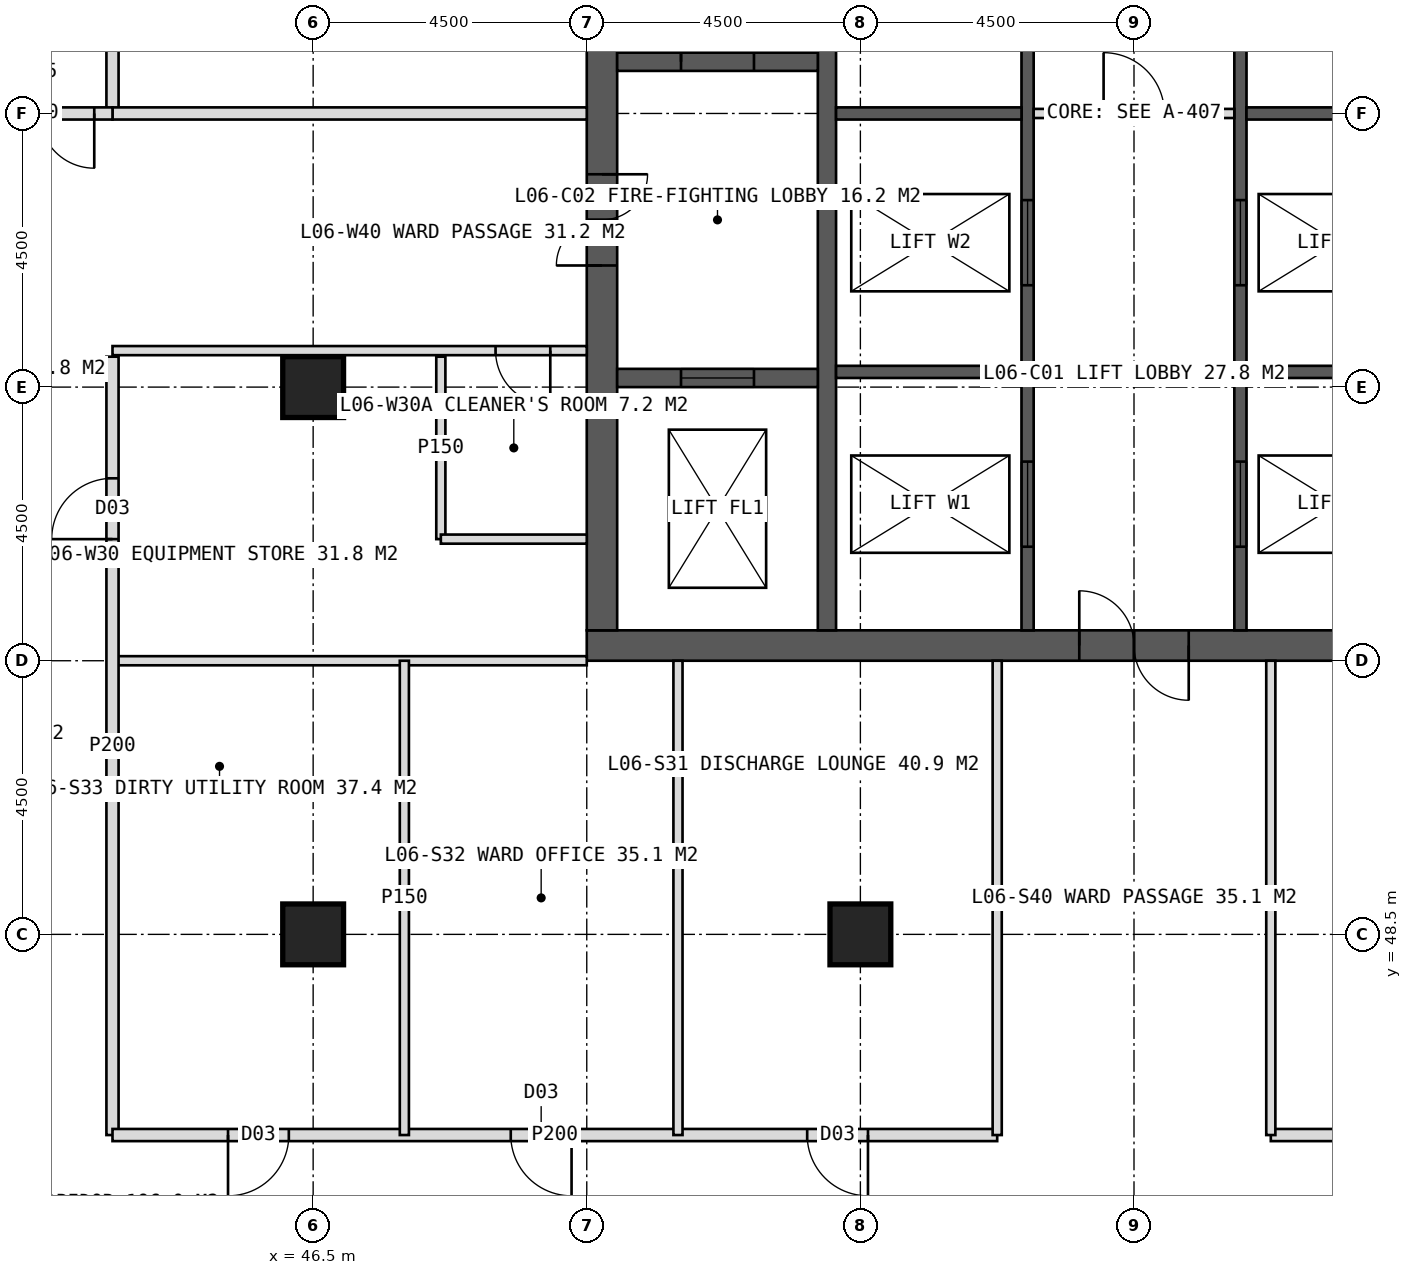
"""IFC4 building model, lengths in metres.
Left out: names, types, materials, properties, quantities, classifications, styles, units other than length and angle.
Written with IfcOpenShell. Run it as: python <this file> out.ifc"""

import sys

from ifc_helpers import new_model, si_unit, direction, frame, frame_2d, origin, origin_2d, place, context, subcontext, project, spatial, rectangle, hollow_rectangle, extrude, element, fill, save


model = new_model("IFC4")
c1 = context("Model", 3, precision=1e-05, world=origin(), true_north=direction((0.0, 1.0)))
c2 = subcontext(c1, "Body", "Model", "MODEL_VIEW")
j1 = project(units=[si_unit("LENGTHUNIT", "METRE"), si_unit("PLANEANGLEUNIT", "RADIAN")], contexts=[c1])
p1 = place(None, origin())
s1 = spatial("IfcSite", under=j1, at=p1, CompositionType="ELEMENT")
p2 = place(p1, origin())
s2 = spatial("IfcBuilding", under=s1, at=p2, CompositionType="ELEMENT")
p3 = place(p2, frame((0.0, 0.0, 31.0)))
s3 = spatial("IfcBuildingStorey", under=s2, at=p3, CompositionType="ELEMENT", Elevation=31.0)
p4 = place(p3, frame((51.0, 53.25, 0.0), z_axis=(0.0, 0.0, 1.0), x_axis=(1.0, 0.0, 0.0)))
e1 = element("IfcWall", 1, at=p4, inside=s3, PredefinedType="SHEAR", context=c2, shape_type="SweptSolid", body=[
    extrude(rectangle(XDim=18.0, YDim=0.5, at=frame_2d((9.0, 0.0))), origin(), (0.0, 0.0, 1.0), 4.0),
])
p5 = place(p4, frame((8.1, 0.0, 0.0)))
e2 = element("IfcOpeningElement", 2, at=p5, cuts=e1, PredefinedType="OPENING", context=c2, shape_type="SweptSolid", body=[
    extrude(rectangle(XDim=1.8, YDim=2.2, at=frame_2d((0.9, 1.1))), frame((0.0, 0.26, 0.0), z_axis=(0.0, -1.0, 0.0), x_axis=(1.0, 0.0, 0.0)), (0.0, 0.0, 1.0), 0.52),
])
p6 = place(p3, frame((51.25, 53.5, 0.0), z_axis=(0.0, 0.0, 1.0), x_axis=(0.0, 1.0, 0.0)))
e3 = element("IfcWall", 3, at=p6, inside=s3, PredefinedType="SHEAR", context=c2, shape_type="SweptSolid", body=[
    extrude(rectangle(XDim=17.0, YDim=0.5, at=frame_2d((8.5, 0.0))), origin(), (0.0, 0.0, 1.0), 4.0),
])
p7 = place(p6, frame((6.0, 0.0, 0.0)))
e4 = element("IfcOpeningElement", 4, at=p7, cuts=e3, PredefinedType="OPENING", context=c2, shape_type="SweptSolid", body=[
    extrude(rectangle(XDim=1.5, YDim=2.2, at=frame_2d((0.75, 1.1))), frame((0.0, 0.26, 0.0), z_axis=(0.0, -1.0, 0.0), x_axis=(1.0, 0.0, 0.0)), (0.0, 0.0, 1.0), 0.52),
])
p8 = place(p3, frame((54.95, 53.5, 0.0), z_axis=(0.0, 0.0, 1.0), x_axis=(0.0, 1.0, 0.0)))
e5 = element("IfcWall", 5, at=p8, inside=s3, PredefinedType="SHEAR", context=c2, shape_type="SweptSolid", body=[
    extrude(rectangle(XDim=17.0, YDim=0.3, at=frame_2d((8.5, 0.0))), origin(), (0.0, 0.0, 1.0), 4.0),
])
p9 = place(p3, frame((58.25, 53.5, 0.0), z_axis=(0.0, 0.0, 1.0), x_axis=(0.0, 1.0, 0.0)))
e6 = element("IfcWall", 6, at=p9, inside=s3, PredefinedType="SHEAR", context=c2, shape_type="SweptSolid", body=[
    extrude(rectangle(XDim=17.0, YDim=0.2, at=frame_2d((8.5, 0.0))), origin(), (0.0, 0.0, 1.0), 4.0),
])
p10 = place(p9, frame((1.375, 0.0, 0.0)))
e7 = element("IfcOpeningElement", 7, at=p10, cuts=e6, PredefinedType="OPENING", context=c2, shape_type="SweptSolid", body=[
    extrude(rectangle(XDim=1.4, YDim=2.2, at=frame_2d((0.7, 1.1))), frame((0.0, 0.11, 0.0), z_axis=(0.0, -1.0, 0.0), x_axis=(1.0, 0.0, 0.0)), (0.0, 0.0, 1.0), 0.22),
])
p11 = place(p9, frame((5.675, 0.0, 0.0)))
e8 = element("IfcOpeningElement", 8, at=p11, cuts=e6, PredefinedType="OPENING", context=c2, shape_type="SweptSolid", body=[
    extrude(rectangle(XDim=1.4, YDim=2.2, at=frame_2d((0.7, 1.1))), frame((0.0, 0.11, 0.0), z_axis=(0.0, -1.0, 0.0), x_axis=(1.0, 0.0, 0.0)), (0.0, 0.0, 1.0), 0.22),
])
p12 = place(p3, frame((61.75, 53.5, 0.0), z_axis=(0.0, 0.0, 1.0), x_axis=(0.0, 1.0, 0.0)))
e9 = element("IfcWall", 9, at=p12, inside=s3, PredefinedType="SHEAR", context=c2, shape_type="SweptSolid", body=[
    extrude(rectangle(XDim=17.0, YDim=0.2, at=frame_2d((8.5, 0.0))), origin(), (0.0, 0.0, 1.0), 4.0),
])
p13 = place(p12, frame((1.375, 0.0, 0.0)))
e10 = element("IfcOpeningElement", 10, at=p13, cuts=e9, PredefinedType="OPENING", context=c2, shape_type="SweptSolid", body=[
    extrude(rectangle(XDim=1.4, YDim=2.2, at=frame_2d((0.7, 1.1))), frame((0.0, 0.11, 0.0), z_axis=(0.0, -1.0, 0.0), x_axis=(1.0, 0.0, 0.0)), (0.0, 0.0, 1.0), 0.22),
])
p14 = place(p12, frame((5.675, 0.0, 0.0)))
e11 = element("IfcOpeningElement", 11, at=p14, cuts=e9, PredefinedType="OPENING", context=c2, shape_type="SweptSolid", body=[
    extrude(rectangle(XDim=1.4, YDim=2.2, at=frame_2d((0.7, 1.1))), frame((0.0, 0.11, 0.0), z_axis=(0.0, -1.0, 0.0), x_axis=(1.0, 0.0, 0.0)), (0.0, 0.0, 1.0), 0.22),
])
for number, where, z_axis, x_axis in (
    (12, (55.1, 57.75, 0.0), (0.0, 0.0, 1.0), (1.0, 0.0, 0.0)),
    (13, (61.85, 57.75, 0.0), (0.0, 0.0, 1.0), (1.0, 0.0, 0.0)),
    (14, (55.1, 62.0, 0.0), (0.0, 0.0, 1.0), (1.0, 0.0, 0.0)),
    (15, (61.85, 62.0, 0.0), (0.0, 0.0, 1.0), (1.0, 0.0, 0.0)),
):
    element("IfcWall", number, at=place(p3, frame(where, z_axis=z_axis, x_axis=x_axis)), inside=s3, PredefinedType="SHEAR", context=c2, shape_type="SweptSolid", body=[
        extrude(rectangle(XDim=3.05, YDim=0.2, at=frame_2d((1.525, 0.0))), origin(), (0.0, 0.0, 1.0), 4.0),
    ])
p15 = place(p3, frame((51.5, 62.85, 0.0), z_axis=(0.0, 0.0, 1.0), x_axis=(1.0, 0.0, 0.0)))
e16 = element("IfcWall", 16, at=p15, inside=s3, PredefinedType="SHEAR", context=c2, shape_type="SweptSolid", body=[
    extrude(rectangle(XDim=3.3, YDim=0.3, at=frame_2d((1.65, 0.0))), origin(), (0.0, 0.0, 1.0), 4.0),
])
p16 = place(p15, frame((1.05, 0.0, 0.0)))
e17 = element("IfcOpeningElement", 17, at=p16, cuts=e16, PredefinedType="OPENING", context=c2, shape_type="SweptSolid", body=[
    extrude(rectangle(XDim=1.2, YDim=2.1, at=frame_2d((0.6, 1.05))), frame((0.0, 0.16, 0.0), z_axis=(0.0, -1.0, 0.0), x_axis=(1.0, 0.0, 0.0)), (0.0, 0.0, 1.0), 0.32),
])
p17 = place(p3, frame((51.5, 57.65, 0.0), z_axis=(0.0, 0.0, 1.0), x_axis=(1.0, 0.0, 0.0)))
e18 = element("IfcWall", 18, at=p17, inside=s3, PredefinedType="SHEAR", context=c2, shape_type="SweptSolid", body=[
    extrude(rectangle(XDim=3.3, YDim=0.3, at=frame_2d((1.65, 0.0))), origin(), (0.0, 0.0, 1.0), 4.0),
])
p18 = place(p17, frame((1.05, 0.0, 0.0)))
e19 = element("IfcOpeningElement", 19, at=p18, cuts=e18, PredefinedType="OPENING", context=c2, shape_type="SweptSolid", body=[
    extrude(rectangle(XDim=1.2, YDim=2.2, at=frame_2d((0.6, 1.1))), frame((0.0, 0.16, 0.0), z_axis=(0.0, -1.0, 0.0), x_axis=(1.0, 0.0, 0.0)), (0.0, 0.0, 1.0), 0.32),
])
for number, where, z_axis, x_axis in (
    (20, (46.5, 48.5, 0.0), (0.0, 0.0, 1.0), (1.0, 0.0, 0.0)),
    (21, (55.5, 48.5, 0.0), (0.0, 0.0, 1.0), (1.0, 0.0, 0.0)),
    (22, (46.5, 57.5, 0.0), (0.0, 0.0, 1.0), (1.0, 0.0, 0.0)),
):
    element("IfcColumn", number, at=place(p3, frame(where, z_axis=z_axis, x_axis=x_axis)), inside=s3, PredefinedType="COLUMN", context=c2, shape_type="SweptSolid", body=[
        extrude(hollow_rectangle(XDim=1.0, YDim=1.0, WallThickness=0.1, at=origin_2d()), origin(), (0.0, 0.0, 1.0), 4.0),
    ])
p19 = place(p3, frame((51.0, 53.0, 0.0), z_axis=(0.0, 0.0, 1.0), x_axis=(-1.0, 0.0, 0.0)))
e23 = element("IfcWall", 23, at=p19, inside=s3, PredefinedType="PARTITIONING", context=c2, shape_type="SweptSolid", body=[
    extrude(rectangle(XDim=7.8, YDim=0.15, at=frame_2d((3.9, 0.0))), origin(), (0.0, 0.0, 1.0), 3.75),
])
p20 = place(p3, frame((43.2, 45.2, 0.0), z_axis=(0.0, 0.0, 1.0), x_axis=(0.0, 1.0, 0.0)))
e24 = element("IfcWall", 24, at=p20, inside=s3, PredefinedType="PARTITIONING", context=c2, shape_type="SweptSolid", body=[
    extrude(rectangle(XDim=12.8, YDim=0.2, at=frame_2d((6.4, 0.0))), origin(), (0.0, 0.0, 1.0), 3.75),
])
p21 = place(p20, frame((9.8, 0.0, 0.0)))
e25 = element("IfcOpeningElement", 25, at=p21, cuts=e24, PredefinedType="OPENING", context=c2, shape_type="SweptSolid", body=[
    extrude(rectangle(XDim=1.0, YDim=2.1, at=frame_2d((0.5, 1.05))), frame((0.0, 0.11, 0.0), z_axis=(0.0, -1.0, 0.0), x_axis=(1.0, 0.0, 0.0)), (0.0, 0.0, 1.0), 0.22),
])
p22 = place(p3, frame((43.2, 62.0, 0.0), z_axis=(0.0, 0.0, 1.0), x_axis=(0.0, 1.0, 0.0)))
e26 = element("IfcWall", 26, at=p22, inside=s3, PredefinedType="PARTITIONING", context=c2, shape_type="SweptSolid", body=[
    extrude(rectangle(XDim=16.8, YDim=0.2, at=frame_2d((8.4, 0.0))), origin(), (0.0, 0.0, 1.0), 3.75),
])
p23 = place(p22, frame((4.0, 0.0, 0.0)))
e27 = element("IfcOpeningElement", 27, at=p23, cuts=e26, PredefinedType="OPENING", context=c2, shape_type="SweptSolid", body=[
    extrude(rectangle(XDim=1.0, YDim=2.1, at=frame_2d((0.5, 1.05))), frame((0.0, 0.11, 0.0), z_axis=(0.0, -1.0, 0.0), x_axis=(1.0, 0.0, 0.0)), (0.0, 0.0, 1.0), 0.22),
])
p24 = place(p22, frame((12.4, 0.0, 0.0)))
e28 = element("IfcOpeningElement", 28, at=p24, cuts=e26, PredefinedType="OPENING", context=c2, shape_type="SweptSolid", body=[
    extrude(rectangle(XDim=1.0, YDim=2.1, at=frame_2d((0.5, 1.05))), frame((0.0, 0.11, 0.0), z_axis=(0.0, -1.0, 0.0), x_axis=(1.0, 0.0, 0.0)), (0.0, 0.0, 1.0), 0.22),
])
p25 = place(p3, frame((51.0, 58.1, 0.0), z_axis=(0.0, 0.0, 1.0), x_axis=(-1.0, 0.0, 0.0)))
e29 = element("IfcWall", 29, at=p25, inside=s3, PredefinedType="PARTITIONING", context=c2, shape_type="SweptSolid", body=[
    extrude(rectangle(XDim=7.8, YDim=0.15, at=frame_2d((3.9, 0.0))), origin(), (0.0, 0.0, 1.0), 3.75),
])
p26 = place(p25, frame((0.6, 0.0, 0.0)))
e30 = element("IfcOpeningElement", 30, at=p26, cuts=e29, PredefinedType="OPENING", context=c2, shape_type="SweptSolid", body=[
    extrude(rectangle(XDim=0.9, YDim=2.1, at=frame_2d((0.45, 1.05))), frame((0.0, 0.085, 0.0), z_axis=(0.0, -1.0, 0.0), x_axis=(1.0, 0.0, 0.0)), (0.0, 0.0, 1.0), 0.17),
])
p27 = place(p3, frame((51.0, 62.0, 0.0), z_axis=(0.0, 0.0, 1.0), x_axis=(-1.0, 0.0, 0.0)))
e31 = element("IfcWall", 31, at=p27, inside=s3, PredefinedType="SOLIDWALL", context=c2, shape_type="SweptSolid", body=[
    extrude(rectangle(XDim=7.8, YDim=0.2, at=frame_2d((3.9, 0.0))), origin(), (0.0, 0.0, 1.0), 2.75),
])
p28 = place(p3, frame((48.6, 55.0, 0.0), z_axis=(0.0, 0.0, 1.0), x_axis=(0.0, 1.0, 0.0)))
e32 = element("IfcWall", 32, at=p28, inside=s3, PredefinedType="PARTITIONING", context=c2, shape_type="SweptSolid", body=[
    extrude(rectangle(XDim=3.0, YDim=0.15, at=frame_2d((1.5, 0.0))), origin(), (0.0, 0.0, 1.0), 3.75),
])
p29 = place(p3, frame((51.0, 55.0, 0.0), z_axis=(0.0, 0.0, 1.0), x_axis=(-1.0, 0.0, 0.0)))
e33 = element("IfcWall", 33, at=p29, inside=s3, PredefinedType="PARTITIONING", context=c2, shape_type="SweptSolid", body=[
    extrude(rectangle(XDim=2.4, YDim=0.15, at=frame_2d((1.2, 0.0))), origin(), (0.0, 0.0, 1.0), 3.75),
])
p30 = place(p3, frame((76.8, 45.2, 0.0), z_axis=(0.0, 0.0, 1.0), x_axis=(-1.0, 0.0, 0.0)))
e34 = element("IfcWall", 34, at=p30, inside=s3, PredefinedType="PARTITIONING", context=c2, shape_type="SweptSolid", body=[
    extrude(rectangle(XDim=14.55, YDim=0.2, at=frame_2d((7.275, 0.0))), origin(), (0.0, 0.0, 1.0), 3.75),
])
p31 = place(p30, frame((10.675, 0.0, 0.0)))
e35 = element("IfcOpeningElement", 35, at=p31, cuts=e34, PredefinedType="OPENING", context=c2, shape_type="SweptSolid", body=[
    extrude(rectangle(XDim=1.0, YDim=2.1, at=frame_2d((0.5, 1.05))), frame((0.0, 0.11, 0.0), z_axis=(0.0, -1.0, 0.0), x_axis=(1.0, 0.0, 0.0)), (0.0, 0.0, 1.0), 0.22),
])
p32 = place(p3, frame((57.75, 45.2, 0.0), z_axis=(0.0, 0.0, 1.0), x_axis=(-1.0, 0.0, 0.0)))
e36 = element("IfcWall", 36, at=p32, inside=s3, PredefinedType="PARTITIONING", context=c2, shape_type="SweptSolid", body=[
    extrude(rectangle(XDim=14.55, YDim=0.2, at=frame_2d((7.275, 0.0))), origin(), (0.0, 0.0, 1.0), 3.75),
])
p33 = place(p32, frame((2.125, 0.0, 0.0)))
e37 = element("IfcOpeningElement", 37, at=p33, cuts=e36, PredefinedType="OPENING", context=c2, shape_type="SweptSolid", body=[
    extrude(rectangle(XDim=1.0, YDim=2.1, at=frame_2d((0.5, 1.05))), frame((0.0, 0.11, 0.0), z_axis=(0.0, -1.0, 0.0), x_axis=(1.0, 0.0, 0.0)), (0.0, 0.0, 1.0), 0.22),
])
p34 = place(p32, frame((7.0, 0.0, 0.0)))
e38 = element("IfcOpeningElement", 38, at=p34, cuts=e36, PredefinedType="OPENING", context=c2, shape_type="SweptSolid", body=[
    extrude(rectangle(XDim=1.0, YDim=2.1, at=frame_2d((0.5, 1.05))), frame((0.0, 0.11, 0.0), z_axis=(0.0, -1.0, 0.0), x_axis=(1.0, 0.0, 0.0)), (0.0, 0.0, 1.0), 0.22),
])
p35 = place(p32, frame((11.65, 0.0, 0.0)))
e39 = element("IfcOpeningElement", 39, at=p35, cuts=e36, PredefinedType="OPENING", context=c2, shape_type="SweptSolid", body=[
    extrude(rectangle(XDim=1.0, YDim=2.1, at=frame_2d((0.5, 1.05))), frame((0.0, 0.11, 0.0), z_axis=(0.0, -1.0, 0.0), x_axis=(1.0, 0.0, 0.0)), (0.0, 0.0, 1.0), 0.22),
])
for number, where, z_axis, x_axis in (
    (40, (62.25, 53.0, 0.0), (0.0, 0.0, 1.0), (0.0, -1.0, 0.0)),
    (41, (57.75, 53.0, 0.0), (0.0, 0.0, 1.0), (0.0, -1.0, 0.0)),
    (42, (52.5, 53.0, 0.0), (0.0, 0.0, 1.0), (0.0, -1.0, 0.0)),
    (43, (48.0, 53.0, 0.0), (0.0, 0.0, 1.0), (0.0, -1.0, 0.0)),
):
    element("IfcWall", number, at=place(p3, frame(where, z_axis=z_axis, x_axis=x_axis)), inside=s3, PredefinedType="PARTITIONING", context=c2, shape_type="SweptSolid", body=[
        extrude(rectangle(XDim=7.8, YDim=0.15, at=frame_2d((3.9, 0.0))), origin(), (0.0, 0.0, 1.0), 3.75),
    ])
p36 = place(p3, frame((43.2, 62.0, 0.0), z_axis=(0.0, 0.0, 1.0), x_axis=(-1.0, 0.0, 0.0)))
e44 = element("IfcWall", 44, at=p36, inside=s3, PredefinedType="SOLIDWALL", context=c2, shape_type="SweptSolid", body=[
    extrude(rectangle(XDim=2.7, YDim=0.2, at=frame_2d((1.35, 0.0))), origin(), (0.0, 0.0, 1.0), 2.75),
])
p37 = place(p36, frame((0.3, 0.0, 0.0)))
e45 = element("IfcOpeningElement", 45, at=p37, cuts=e44, PredefinedType="OPENING", context=c2, shape_type="SweptSolid", body=[
    extrude(rectangle(XDim=1.8, YDim=2.2, at=frame_2d((0.9, 1.1))), frame((0.0, 0.11, 0.0), z_axis=(0.0, -1.0, 0.0), x_axis=(1.0, 0.0, 0.0)), (0.0, 0.0, 1.0), 0.22),
])
p38 = place(p3, frame((58.35, 62.0, 0.0), z_axis=(0.0, 0.0, 1.0), x_axis=(1.0, 0.0, 0.0)))
e46 = element("IfcWall", 46, at=p38, inside=s3, PredefinedType="PARTITIONING", context=c2, shape_type="SweptSolid", body=[
    extrude(rectangle(XDim=3.3, YDim=0.15, at=frame_2d((1.65, 0.0))), origin(), (0.0, 0.0, 1.0), 3.75),
])
p39 = place(p38, frame((1.15, 0.0, 0.0)))
e47 = element("IfcOpeningElement", 47, at=p39, cuts=e46, PredefinedType="OPENING", context=c2, shape_type="SweptSolid", body=[
    extrude(rectangle(XDim=1.0, YDim=2.1, at=frame_2d((0.5, 1.05))), frame((0.0, 0.085, 0.0), z_axis=(0.0, -1.0, 0.0), x_axis=(1.0, 0.0, 0.0)), (0.0, 0.0, 1.0), 0.17),
])
p40 = place(p26, origin())
e48 = element("IfcDoor", 48, at=p40, inside=s3, OperationType="SINGLE_SWING_LEFT", PredefinedType="DOOR", context=c2, shape_type="SweptSolid", body=[
    extrude(rectangle(XDim=0.9, YDim=2.1, at=frame_2d((0.45, 1.05))), frame((0.0, 0.025, 0.0), z_axis=(0.0, -1.0, 0.0), x_axis=(1.0, 0.0, 0.0)), (0.0, 0.0, 1.0), 0.05),
])
fill(e30, e48)
p41 = place(p21, origin())
e49 = element("IfcDoor", 49, at=p41, inside=s3, OperationType="SINGLE_SWING_LEFT", PredefinedType="DOOR", context=c2, shape_type="SweptSolid", body=[
    extrude(rectangle(XDim=1.0, YDim=2.1, at=frame_2d((0.5, 1.05))), frame((0.0, 0.025, 0.0), z_axis=(0.0, -1.0, 0.0), x_axis=(1.0, 0.0, 0.0)), (0.0, 0.0, 1.0), 0.05),
])
fill(e25, e49)
p42 = place(p33, origin())
e50 = element("IfcDoor", 50, at=p42, inside=s3, OperationType="SINGLE_SWING_LEFT", PredefinedType="DOOR", context=c2, shape_type="SweptSolid", body=[
    extrude(rectangle(XDim=1.0, YDim=2.1, at=frame_2d((0.5, 1.05))), frame((0.0, 0.025, 0.0), z_axis=(0.0, -1.0, 0.0), x_axis=(1.0, 0.0, 0.0)), (0.0, 0.0, 1.0), 0.05),
])
fill(e37, e50)
p43 = place(p34, origin())
e51 = element("IfcDoor", 51, at=p43, inside=s3, OperationType="SINGLE_SWING_LEFT", PredefinedType="DOOR", context=c2, shape_type="SweptSolid", body=[
    extrude(rectangle(XDim=1.0, YDim=2.1, at=frame_2d((0.5, 1.05))), frame((0.0, 0.025, 0.0), z_axis=(0.0, -1.0, 0.0), x_axis=(1.0, 0.0, 0.0)), (0.0, 0.0, 1.0), 0.05),
])
fill(e38, e51)
p44 = place(p35, origin())
e52 = element("IfcDoor", 52, at=p44, inside=s3, OperationType="SINGLE_SWING_RIGHT", PredefinedType="DOOR", context=c2, shape_type="SweptSolid", body=[
    extrude(rectangle(XDim=1.0, YDim=2.1, at=frame_2d((0.5, 1.05))), frame((0.0, 0.025, 0.0), z_axis=(0.0, -1.0, 0.0), x_axis=(1.0, 0.0, 0.0)), (0.0, 0.0, 1.0), 0.05),
])
fill(e39, e52)
p45 = place(p37, origin())
e53 = element("IfcDoor", 53, at=p45, inside=s3, OperationType="DOUBLE_DOOR_DOUBLE_SWING", PredefinedType="DOOR", context=c2, shape_type="SweptSolid", body=[
    extrude(rectangle(XDim=1.8, YDim=2.2, at=frame_2d((0.9, 1.1))), frame((0.0, 0.025, 0.0), z_axis=(0.0, -1.0, 0.0), x_axis=(1.0, 0.0, 0.0)), (0.0, 0.0, 1.0), 0.05),
])
fill(e45, e53)
p46 = place(p5, origin())
e54 = element("IfcDoor", 54, at=p46, inside=s3, OperationType="DOUBLE_DOOR_SINGLE_SWING", PredefinedType="DOOR", context=c2, shape_type="SweptSolid", body=[
    extrude(rectangle(XDim=1.8, YDim=2.2, at=frame_2d((0.9, 1.1))), frame((0.0, 0.025, 0.0), z_axis=(0.0, -1.0, 0.0), x_axis=(1.0, 0.0, 0.0)), (0.0, 0.0, 1.0), 0.05),
])
fill(e2, e54)
p47 = place(p7, origin())
e55 = element("IfcDoor", 55, at=p47, inside=s3, OperationType="DOUBLE_DOOR_SINGLE_SWING", PredefinedType="DOOR", context=c2, shape_type="SweptSolid", body=[
    extrude(rectangle(XDim=1.5, YDim=2.2, at=frame_2d((0.75, 1.1))), frame((0.0, 0.025, 0.0), z_axis=(0.0, -1.0, 0.0), x_axis=(1.0, 0.0, 0.0)), (0.0, 0.0, 1.0), 0.05),
])
fill(e4, e55)
p48 = place(p16, origin())
e56 = element("IfcDoor", 56, at=p48, inside=s3, OperationType="SINGLE_SWING_LEFT", PredefinedType="DOOR", context=c2, shape_type="SweptSolid", body=[
    extrude(rectangle(XDim=1.2, YDim=2.1, at=frame_2d((0.6, 1.05))), frame((0.0, 0.025, 0.0), z_axis=(0.0, -1.0, 0.0), x_axis=(1.0, 0.0, 0.0)), (0.0, 0.0, 1.0), 0.05),
])
fill(e17, e56)
p49 = place(p18, origin())
e57 = element("IfcDoor", 57, at=p49, inside=s3, OperationType="SLIDING_TO_LEFT", PredefinedType="DOOR", context=c2, shape_type="SweptSolid", body=[
    extrude(rectangle(XDim=1.2, YDim=2.2, at=frame_2d((0.6, 1.1))), frame((0.0, 0.025, 0.0), z_axis=(0.0, -1.0, 0.0), x_axis=(1.0, 0.0, 0.0)), (0.0, 0.0, 1.0), 0.05),
])
fill(e19, e57)
p50 = place(p10, origin())
e58 = element("IfcDoor", 58, at=p50, inside=s3, OperationType="SLIDING_TO_LEFT", PredefinedType="DOOR", context=c2, shape_type="SweptSolid", body=[
    extrude(rectangle(XDim=1.4, YDim=2.2, at=frame_2d((0.7, 1.1))), frame((0.0, 0.025, 0.0), z_axis=(0.0, -1.0, 0.0), x_axis=(1.0, 0.0, 0.0)), (0.0, 0.0, 1.0), 0.05),
])
fill(e7, e58)
p51 = place(p13, origin())
e59 = element("IfcDoor", 59, at=p51, inside=s3, OperationType="SLIDING_TO_LEFT", PredefinedType="DOOR", context=c2, shape_type="SweptSolid", body=[
    extrude(rectangle(XDim=1.4, YDim=2.2, at=frame_2d((0.7, 1.1))), frame((0.0, 0.025, 0.0), z_axis=(0.0, -1.0, 0.0), x_axis=(1.0, 0.0, 0.0)), (0.0, 0.0, 1.0), 0.05),
])
fill(e10, e59)
p52 = place(p11, origin())
e60 = element("IfcDoor", 60, at=p52, inside=s3, OperationType="SLIDING_TO_LEFT", PredefinedType="DOOR", context=c2, shape_type="SweptSolid", body=[
    extrude(rectangle(XDim=1.4, YDim=2.2, at=frame_2d((0.7, 1.1))), frame((0.0, 0.025, 0.0), z_axis=(0.0, -1.0, 0.0), x_axis=(1.0, 0.0, 0.0)), (0.0, 0.0, 1.0), 0.05),
])
fill(e8, e60)
p53 = place(p14, origin())
e61 = element("IfcDoor", 61, at=p53, inside=s3, OperationType="SLIDING_TO_LEFT", PredefinedType="DOOR", context=c2, shape_type="SweptSolid", body=[
    extrude(rectangle(XDim=1.4, YDim=2.2, at=frame_2d((0.7, 1.1))), frame((0.0, 0.025, 0.0), z_axis=(0.0, -1.0, 0.0), x_axis=(1.0, 0.0, 0.0)), (0.0, 0.0, 1.0), 0.05),
])
fill(e11, e61)
p54 = place(p39, origin())
e62 = element("IfcDoor", 62, at=p54, inside=s3, OperationType="SINGLE_SWING_LEFT", PredefinedType="DOOR", context=c2, shape_type="SweptSolid", body=[
    extrude(rectangle(XDim=1.0, YDim=2.1, at=frame_2d((0.5, 1.05))), frame((0.0, 0.025, 0.0), z_axis=(0.0, -1.0, 0.0), x_axis=(1.0, 0.0, 0.0)), (0.0, 0.0, 1.0), 0.05),
])
fill(e47, e62)
save(model, sys.argv[1])
